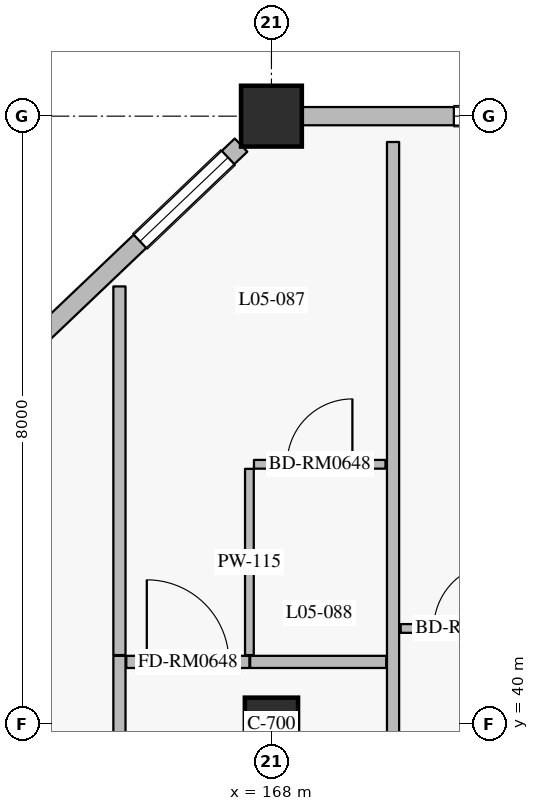
"""IFC4 building model, lengths in metres.
Left out: names, types, materials, properties, quantities, classifications, styles, units other than length and angle.
Written with IfcOpenShell. Run it as: python <this file> out.ifc"""

import sys

from ifc_helpers import new_model, si_unit, direction, frame, frame_2d, origin, origin_2d, place, context, subcontext, project, spatial, rectangle, extrude, element, fill, save


model = new_model("IFC4")
c1 = context("Model", 3, precision=1e-05, world=origin(), true_north=direction((0.0, 1.0)))
c2 = subcontext(c1, "Body", "Model", "MODEL_VIEW")
j1 = project(units=[si_unit("LENGTHUNIT", "METRE"), si_unit("PLANEANGLEUNIT", "RADIAN")], contexts=[c1])
p1 = place(None, origin())
s1 = spatial("IfcSite", under=j1, at=p1, CompositionType="ELEMENT")
p2 = place(p1, origin())
s2 = spatial("IfcBuilding", under=s1, at=p2, CompositionType="ELEMENT")
p3 = place(p2, frame((0.0, 0.0, 25.2)))
s3 = spatial("IfcBuildingStorey", under=s2, at=p3, CompositionType="ELEMENT", Elevation=25.2)
p4 = place(p3, frame((168.0, 48.0, 0.0), z_axis=(0.0, 0.0, 1.0), x_axis=(1.0, 0.0, 0.0)))
e1 = element("IfcColumn", 1, at=p4, inside=s3, PredefinedType="COLUMN", context=c2, shape_type="SweptSolid", body=[
    extrude(rectangle(XDim=0.8, YDim=0.8, at=origin_2d()), origin(), (0.0, 0.0, 1.0), 3.6),
])
p5 = place(p3, frame((168.0, 40.0, 0.0), z_axis=(0.0, 0.0, 1.0), x_axis=(1.0, 0.0, 0.0)))
e2 = element("IfcColumn", 2, at=p5, inside=s3, PredefinedType="COLUMN", context=c2, shape_type="SweptSolid", body=[
    extrude(rectangle(XDim=0.7, YDim=0.7, at=origin_2d()), origin(), (0.0, 0.0, 1.0), 3.6),
])
p6 = place(p3, frame((160.0, 40.381, 0.0), z_axis=(0.0, 0.0, 1.0), x_axis=(0.724156739794, 0.689635422677, 0.0)))
e3 = element("IfcWall", 3, at=p6, inside=s3, PredefinedType="SOLIDWALL", context=c2, shape_type="SweptSolid", body=[
    extrude(rectangle(XDim=10.495, YDim=0.24, at=frame_2d((5.248, 0.0))), origin(), (0.0, 0.0, 1.0), 2.93),
])
p7 = place(p6, frame((0.926, 0.0, 0.8)))
e4 = element("IfcOpeningElement", 4, at=p7, cuts=e3, PredefinedType="OPENING", context=c2, shape_type="SweptSolid", body=[
    extrude(rectangle(XDim=1.6, YDim=1.6, at=frame_2d((0.8, 0.8))), frame((0.0, 0.13, 0.0), z_axis=(0.0, -1.0, 0.0), x_axis=(1.0, 0.0, 0.0)), (0.0, 0.0, 1.0), 0.26),
])
p8 = place(p6, frame((5.138, 0.0, 0.8)))
e5 = element("IfcOpeningElement", 5, at=p8, cuts=e3, PredefinedType="OPENING", context=c2, shape_type="SweptSolid", body=[
    extrude(rectangle(XDim=1.6, YDim=1.6, at=frame_2d((0.8, 0.8))), frame((0.0, 0.13, 0.0), z_axis=(0.0, -1.0, 0.0), x_axis=(1.0, 0.0, 0.0)), (0.0, 0.0, 1.0), 0.26),
])
p9 = place(p6, frame((8.659, 0.0, 0.8)))
e6 = element("IfcOpeningElement", 6, at=p9, cuts=e3, PredefinedType="OPENING", context=c2, shape_type="SweptSolid", body=[
    extrude(rectangle(XDim=1.6, YDim=1.6, at=frame_2d((0.8, 0.8))), frame((0.0, 0.13, 0.0), z_axis=(0.0, -1.0, 0.0), x_axis=(1.0, 0.0, 0.0)), (0.0, 0.0, 1.0), 0.26),
])
p10 = place(p3, frame((168.4, 48.0, 0.0), z_axis=(0.0, 0.0, 1.0), x_axis=(1.0, 0.0, 0.0)))
e7 = element("IfcWall", 7, at=p10, inside=s3, PredefinedType="SOLIDWALL", context=c2, shape_type="SweptSolid", body=[
    extrude(rectangle(XDim=7.6, YDim=0.24, at=frame_2d((3.8, 0.0))), origin(), (0.0, 0.0, 1.0), 2.89),
])
p11 = place(p10, frame((2.0, 0.0, 0.8)))
e8 = element("IfcOpeningElement", 8, at=p11, cuts=e7, PredefinedType="OPENING", context=c2, shape_type="SweptSolid", body=[
    extrude(rectangle(XDim=2.0, YDim=1.75, at=frame_2d((1.0, 0.875))), frame((0.0, 0.13, 0.0), z_axis=(0.0, -1.0, 0.0), x_axis=(1.0, 0.0, 0.0)), (0.0, 0.0, 1.0), 0.26),
])
p12 = place(p10, frame((5.25, 0.0, 0.8)))
e9 = element("IfcOpeningElement", 9, at=p12, cuts=e7, PredefinedType="OPENING", context=c2, shape_type="SweptSolid", body=[
    extrude(rectangle(XDim=2.0, YDim=1.75, at=frame_2d((1.0, 0.875))), frame((0.0, 0.13, 0.0), z_axis=(0.0, -1.0, 0.0), x_axis=(1.0, 0.0, 0.0)), (0.0, 0.0, 1.0), 0.26),
])
p13 = place(p3, frame((166.0, 32.26, 0.0), z_axis=(0.0, 0.0, 1.0), x_axis=(0.0, 1.0, 0.0)))
e10 = element("IfcWall", 10, at=p13, inside=s3, PredefinedType="PARTITIONING", context=c2, shape_type="SweptSolid", body=[
    extrude(rectangle(XDim=8.64, YDim=0.16, at=frame_2d((4.32, 0.0))), origin(), (0.0, 0.0, 1.0), 3.335),
])
p14 = place(p3, frame((166.09, 40.82, 0.0), z_axis=(0.0, 0.0, 1.0), x_axis=(1.0, 0.0, 0.0)))
e11 = element("IfcWall", 11, at=p14, inside=s3, PredefinedType="PARTITIONING", context=c2, shape_type="SweptSolid", body=[
    extrude(rectangle(XDim=1.62, YDim=0.16, at=frame_2d((0.81, 0.0))), origin(), (0.0, 0.0, 1.0), 3.335),
])
p15 = place(p14, frame((0.27, 0.0, 0.0)))
e12 = element("IfcOpeningElement", 12, at=p15, cuts=e11, PredefinedType="OPENING", context=c2, shape_type="SweptSolid", body=[
    extrude(rectangle(XDim=1.08, YDim=2.3, at=frame_2d((0.54, 1.15))), frame((0.0, 0.09, 0.0), z_axis=(0.0, -1.0, 0.0), x_axis=(1.0, 0.0, 0.0)), (0.0, 0.0, 1.0), 0.18),
])
p16 = place(p3, frame((167.72, 40.82, 0.0), z_axis=(0.0, 0.0, 1.0), x_axis=(1.0, 0.0, 0.0)))
e13 = element("IfcWall", 13, at=p16, inside=s3, PredefinedType="PARTITIONING", context=c2, shape_type="SweptSolid", body=[
    extrude(rectangle(XDim=1.79, YDim=0.16, at=frame_2d((0.895, 0.0))), origin(), (0.0, 0.0, 1.0), 3.335),
])
p17 = place(p3, frame((167.71, 40.91, 0.0), z_axis=(0.0, 0.0, 1.0), x_axis=(0.0, 1.0, 0.0)))
e14 = element("IfcWall", 14, at=p17, inside=s3, PredefinedType="PARTITIONING", context=c2, shape_type="SweptSolid", body=[
    extrude(rectangle(XDim=2.45, YDim=0.115, at=frame_2d((1.225, 0.0))), origin(), (0.0, 0.0, 1.0), 3.335),
])
p18 = place(p3, frame((167.77, 43.42, 0.0), z_axis=(0.0, 0.0, 1.0), x_axis=(1.0, 0.0, 0.0)))
e15 = element("IfcWall", 15, at=p18, inside=s3, PredefinedType="PARTITIONING", context=c2, shape_type="SweptSolid", body=[
    extrude(rectangle(XDim=1.73, YDim=0.115, at=frame_2d((0.865, 0.0))), origin(), (0.0, 0.0, 1.0), 3.335),
])
p19 = place(p18, frame((0.435, 0.0, 0.0)))
e16 = element("IfcOpeningElement", 16, at=p19, cuts=e15, PredefinedType="OPENING", context=c2, shape_type="SweptSolid", body=[
    extrude(rectangle(XDim=0.86, YDim=2.12, at=frame_2d((0.43, 1.06))), frame((0.0, 0.067, 0.0), z_axis=(0.0, -1.0, 0.0), x_axis=(1.0, 0.0, 0.0)), (0.0, 0.0, 1.0), 0.135),
])
p20 = place(p3, frame((166.0, 40.91, 0.0), z_axis=(0.0, 0.0, 1.0), x_axis=(0.0, 1.0, 0.0)))
e17 = element("IfcWall", 17, at=p20, inside=s3, PredefinedType="PARTITIONING", context=c2, shape_type="SweptSolid", body=[
    extrude(rectangle(XDim=4.85, YDim=0.16, at=frame_2d((2.425, 0.0))), origin(), (0.0, 0.0, 1.0), 3.335),
])
p21 = place(p3, frame((169.7, 41.26, 0.0), z_axis=(0.0, 0.0, 1.0), x_axis=(1.0, 0.0, 0.0)))
e18 = element("IfcWall", 18, at=p21, inside=s3, PredefinedType="PARTITIONING", context=c2, shape_type="SweptSolid", body=[
    extrude(rectangle(XDim=1.73, YDim=0.115, at=frame_2d((0.865, 0.0))), origin(), (0.0, 0.0, 1.0), 3.335),
])
p22 = place(p21, frame((0.435, 0.0, 0.0)))
e19 = element("IfcOpeningElement", 19, at=p22, cuts=e18, PredefinedType="OPENING", context=c2, shape_type="SweptSolid", body=[
    extrude(rectangle(XDim=0.86, YDim=2.12, at=frame_2d((0.43, 1.06))), frame((0.0, 0.067, 0.0), z_axis=(0.0, -1.0, 0.0), x_axis=(1.0, 0.0, 0.0)), (0.0, 0.0, 1.0), 0.135),
])
p23 = place(p3, frame((169.6, 38.75, 0.0), z_axis=(0.0, 0.0, 1.0), x_axis=(0.0, 1.0, 0.0)))
e20 = element("IfcWall", 20, at=p23, inside=s3, PredefinedType="PARTITIONING", context=c2, shape_type="SweptSolid", body=[
    extrude(rectangle(XDim=8.91, YDim=0.16, at=frame_2d((4.455, 0.0))), origin(), (0.0, 0.0, 1.0), 3.335),
])
p24 = place(p9, origin())
e21 = element("IfcWindow", 21, at=p24, inside=s3, PartitioningType="SINGLE_PANEL", PredefinedType="WINDOW", context=c2, shape_type="SweptSolid", body=[
    extrude(rectangle(XDim=1.6, YDim=1.6, at=frame_2d((0.8, 0.8))), frame((0.0, 0.03, 0.0), z_axis=(0.0, -1.0, 0.0), x_axis=(1.0, 0.0, 0.0)), (0.0, 0.0, 1.0), 0.06),
])
fill(e6, e21)
p25 = place(p11, origin())
e22 = element("IfcWindow", 22, at=p25, inside=s3, PartitioningType="DOUBLE_PANEL_VERTICAL", PredefinedType="WINDOW", context=c2, shape_type="SweptSolid", body=[
    extrude(rectangle(XDim=2.0, YDim=1.75, at=frame_2d((1.0, 0.875))), frame((0.0, 0.03, 0.0), z_axis=(0.0, -1.0, 0.0), x_axis=(1.0, 0.0, 0.0)), (0.0, 0.0, 1.0), 0.06),
])
fill(e8, e22)
p26 = place(p15, origin())
e23 = element("IfcDoor", 23, at=p26, inside=s3, OperationType="SINGLE_SWING_LEFT", PredefinedType="DOOR", context=c2, shape_type="SweptSolid", body=[
    extrude(rectangle(XDim=1.08, YDim=2.3, at=frame_2d((0.54, 1.15))), frame((0.0, 0.025, 0.0), z_axis=(0.0, -1.0, 0.0), x_axis=(1.0, 0.0, 0.0)), (0.0, 0.0, 1.0), 0.05),
])
fill(e12, e23)
p27 = place(p19, origin())
e24 = element("IfcDoor", 24, at=p27, inside=s3, OperationType="SINGLE_SWING_RIGHT", PredefinedType="DOOR", context=c2, shape_type="SweptSolid", body=[
    extrude(rectangle(XDim=0.86, YDim=2.12, at=frame_2d((0.43, 1.06))), frame((0.0, 0.025, 0.0), z_axis=(0.0, -1.0, 0.0), x_axis=(1.0, 0.0, 0.0)), (0.0, 0.0, 1.0), 0.05),
])
fill(e16, e24)
p28 = place(p22, origin())
e25 = element("IfcDoor", 25, at=p28, inside=s3, OperationType="SINGLE_SWING_RIGHT", PredefinedType="DOOR", context=c2, shape_type="SweptSolid", body=[
    extrude(rectangle(XDim=0.86, YDim=2.12, at=frame_2d((0.43, 1.06))), frame((0.0, 0.025, 0.0), z_axis=(0.0, -1.0, 0.0), x_axis=(1.0, 0.0, 0.0)), (0.0, 0.0, 1.0), 0.05),
])
fill(e19, e25)
save(model, sys.argv[1])
